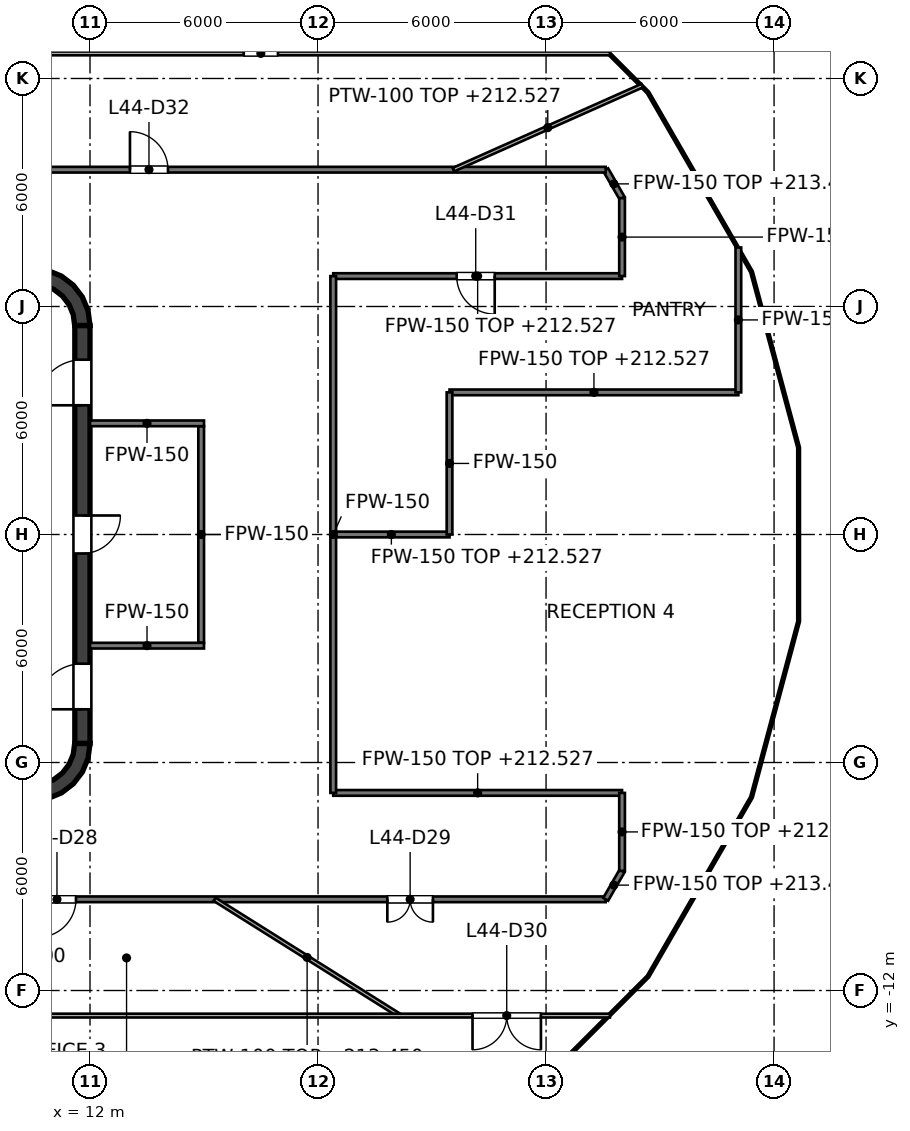
"""IFC4 building model, lengths in metres.
Left out: names, types, materials, properties, quantities, classifications, styles, units other than length and angle.
Written with IfcOpenShell. Run it as: python <this file> out.ifc"""

import sys

from ifc_helpers import new_model, si_unit, direction, frame, frame_2d, origin, place, context, subcontext, project, spatial, polyline, rectangle, outline, extrude, element, fill, save


model = new_model("IFC4")
c1 = context("Model", 3, precision=1e-05, world=origin(), true_north=direction((0.0, 1.0)))
c2 = subcontext(c1, "Body", "Model", "MODEL_VIEW")
j1 = project(units=[si_unit("LENGTHUNIT", "METRE"), si_unit("PLANEANGLEUNIT", "RADIAN")], contexts=[c1])
p1 = place(None, origin())
s1 = spatial("IfcSite", under=j1, at=p1, CompositionType="ELEMENT")
p2 = place(p1, origin())
s2 = spatial("IfcBuilding", under=s1, at=p2, CompositionType="ELEMENT")
p3 = place(p2, frame((0.0, 0.0, 209.6)))
s3 = spatial("IfcBuildingStorey", under=s2, at=p3, CompositionType="ELEMENT", Elevation=209.6)
p4 = place(p3, frame((11.8, -5.5, 0.0), z_axis=(0.0, 0.0, 1.0), x_axis=(0.0, 1.0, 0.0)))
e1 = element("IfcWall", 1, at=p4, inside=s3, PredefinedType="SHEAR", context=c2, shape_type="SweptSolid", body=[
    extrude(rectangle(XDim=11.0, YDim=0.4, at=frame_2d((5.5, 0.0))), origin(), (0.0, 0.0, 1.0), 4.0),
])
p5 = place(p4, frame((5.0, 0.0, 0.0)))
e2 = element("IfcOpeningElement", 2, at=p5, cuts=e1, PredefinedType="OPENING", context=c2, shape_type="SweptSolid", body=[
    extrude(rectangle(XDim=1.0, YDim=2.1, at=frame_2d((0.5, 1.05))), frame((0.0, 0.2, 0.0), z_axis=(0.0, -1.0, 0.0), x_axis=(1.0, 0.0, 0.0)), (0.0, 0.0, 1.0), 0.4),
])
p6 = place(p4, frame((0.9, 0.0, 0.0)))
e3 = element("IfcOpeningElement", 3, at=p6, cuts=e1, PredefinedType="OPENING", context=c2, shape_type="SweptSolid", body=[
    extrude(rectangle(XDim=1.2, YDim=2.1, at=frame_2d((0.6, 1.05))), frame((0.0, 0.2, 0.0), z_axis=(0.0, -1.0, 0.0), x_axis=(1.0, 0.0, 0.0)), (0.0, 0.0, 1.0), 0.4),
])
p7 = place(p4, frame((8.9, 0.0, 0.0)))
e4 = element("IfcOpeningElement", 4, at=p7, cuts=e1, PredefinedType="OPENING", context=c2, shape_type="SweptSolid", body=[
    extrude(rectangle(XDim=1.2, YDim=2.1, at=frame_2d((0.6, 1.05))), frame((0.0, 0.2, 0.0), z_axis=(0.0, -1.0, 0.0), x_axis=(1.0, 0.0, 0.0)), (0.0, 0.0, 1.0), 0.4),
])
p8 = place(p3, origin())
e5 = element("IfcWall", 5, at=p8, inside=s3, PredefinedType="SHEAR", context=c2, shape_type="SweptSolid", body=[
    extrude(outline(polyline([(10.5, 7.0), (10.5, 6.596), (10.784, 6.559), (11.048, 6.45), (11.275, 6.275), (11.45, 6.048), (11.559, 5.784), (11.596, 5.5), (12.0, 5.5), (11.949, 5.888), (11.799, 6.25), (11.561, 6.561), (11.25, 6.799), (10.888, 6.949), (10.5, 7.0)])), origin(), (0.0, 0.0, 1.0), 4.0),
])
e6 = element("IfcWall", 6, at=p8, inside=s3, PredefinedType="SHEAR", context=c2, shape_type="SweptSolid", body=[
    extrude(outline(polyline([(12.0, -5.5), (11.596, -5.5), (11.559, -5.784), (11.45, -6.048), (11.275, -6.275), (11.048, -6.45), (10.784, -6.559), (10.5, -6.596), (10.5, -7.0), (10.888, -6.949), (11.25, -6.799), (11.561, -6.561), (11.799, -6.25), (11.949, -5.888), (12.0, -5.5)])), origin(), (0.0, 0.0, 1.0), 4.0),
])
p9 = place(p3, frame((14.925, -2.85, 0.0), z_axis=(0.0, 0.0, 1.0), x_axis=(0.0, 1.0, 0.0)))
e7 = element("IfcWall", 7, at=p9, inside=s3, PredefinedType="PARTITIONING", context=c2, shape_type="SweptSolid", body=[
    extrude(rectangle(XDim=5.7, YDim=0.15, at=frame_2d((2.85, 0.0))), origin(), (0.0, 0.0, 1.0), 2.918),
])
for number, where, z_axis, x_axis in (
    (8, (12.0, 2.925, 0.0), (0.0, 0.0, 1.0), (1.0, 0.0, 0.0)),
    (9, (12.0, -2.925, 0.0), (0.0, 0.0, 1.0), (1.0, 0.0, 0.0)),
):
    element("IfcWall", number, at=place(p3, frame(where, z_axis=z_axis, x_axis=x_axis)), inside=s3, PredefinedType="PARTITIONING", context=c2, shape_type="SweptSolid", body=[
        extrude(rectangle(XDim=3.0, YDim=0.15, at=frame_2d((1.5, 0.0))), origin(), (0.0, 0.0, 1.0), 2.918),
    ])
p10 = place(p3, frame((25.569, 9.6, 0.0), z_axis=(0.0, 0.0, 1.0), x_axis=(0.499640762619, -0.866232710263, 0.0)))
e10 = element("IfcWall", 10, at=p10, inside=s3, PredefinedType="PARTITIONING", context=c2, shape_type="SweptSolid", body=[
    extrude(rectangle(XDim=0.863, YDim=0.15, at=frame_2d((0.431, 0.0))), origin(), (0.0, 0.0, 1.0), 3.85),
])
p11 = place(p3, frame((-25.569, -9.6, 0.0), z_axis=(0.0, 0.0, 1.0), x_axis=(1.0, 0.0, 0.0)))
e11 = element("IfcWall", 11, at=p11, inside=s3, PredefinedType="PARTITIONING", context=c2, shape_type="SweptSolid", body=[
    extrude(rectangle(XDim=51.138, YDim=0.15, at=frame_2d((25.569, 0.0))), origin(), (0.0, 0.0, 1.0), 2.918),
])
p12 = place(p11, frame((5.124, 0.0, 0.0)))
e12 = element("IfcOpeningElement", 12, at=p12, cuts=e11, PredefinedType="OPENING", context=c2, shape_type="SweptSolid", body=[
    extrude(rectangle(XDim=1.0, YDim=2.1, at=frame_2d((0.5, 1.05))), frame((0.0, 0.075, 0.0), z_axis=(0.0, -1.0, 0.0), x_axis=(1.0, 0.0, 0.0)), (0.0, 0.0, 1.0), 0.15),
])
p13 = place(p11, frame((13.983, 0.0, 0.0)))
e13 = element("IfcOpeningElement", 13, at=p13, cuts=e11, PredefinedType="OPENING", context=c2, shape_type="SweptSolid", body=[
    extrude(rectangle(XDim=1.0, YDim=2.1, at=frame_2d((0.5, 1.05))), frame((0.0, 0.075, 0.0), z_axis=(0.0, -1.0, 0.0), x_axis=(1.0, 0.0, 0.0)), (0.0, 0.0, 1.0), 0.15),
])
p14 = place(p11, frame((23.533, 0.0, 0.0)))
e14 = element("IfcOpeningElement", 14, at=p14, cuts=e11, PredefinedType="OPENING", context=c2, shape_type="SweptSolid", body=[
    extrude(rectangle(XDim=1.0, YDim=2.1, at=frame_2d((0.5, 1.05))), frame((0.0, 0.075, 0.0), z_axis=(0.0, -1.0, 0.0), x_axis=(1.0, 0.0, 0.0)), (0.0, 0.0, 1.0), 0.15),
])
p15 = place(p11, frame((29.847, 0.0, 0.0)))
e15 = element("IfcOpeningElement", 15, at=p15, cuts=e11, PredefinedType="OPENING", context=c2, shape_type="SweptSolid", body=[
    extrude(rectangle(XDim=1.0, YDim=2.1, at=frame_2d((0.5, 1.05))), frame((0.0, 0.075, 0.0), z_axis=(0.0, -1.0, 0.0), x_axis=(1.0, 0.0, 0.0)), (0.0, 0.0, 1.0), 0.15),
])
p16 = place(p11, frame((36.2, 0.0, 0.0)))
e16 = element("IfcOpeningElement", 16, at=p16, cuts=e11, PredefinedType="OPENING", context=c2, shape_type="SweptSolid", body=[
    extrude(rectangle(XDim=1.0, YDim=2.1, at=frame_2d((0.5, 1.05))), frame((0.0, 0.075, 0.0), z_axis=(0.0, -1.0, 0.0), x_axis=(1.0, 0.0, 0.0)), (0.0, 0.0, 1.0), 0.15),
])
p17 = place(p11, frame((45.393, 0.0, 0.0)))
e17 = element("IfcOpeningElement", 17, at=p17, cuts=e11, PredefinedType="OPENING", context=c2, shape_type="SweptSolid", body=[
    extrude(rectangle(XDim=1.2, YDim=2.1, at=frame_2d((0.6, 1.05))), frame((0.0, 0.075, 0.0), z_axis=(0.0, -1.0, 0.0), x_axis=(1.0, 0.0, 0.0)), (0.0, 0.0, 1.0), 0.15),
])
p18 = place(p3, frame((18.4, -6.8, 0.0), z_axis=(0.0, 0.0, 1.0), x_axis=(1.0, 0.0, 0.0)))
e18 = element("IfcWall", 18, at=p18, inside=s3, PredefinedType="PARTITIONING", context=c2, shape_type="SweptSolid", body=[
    extrude(rectangle(XDim=7.6, YDim=0.15, at=frame_2d((3.8, 0.0))), origin(), (0.0, 0.0, 1.0), 2.927),
])
p19 = place(p3, frame((18.4, 0.0, 0.0), z_axis=(0.0, 0.0, 1.0), x_axis=(1.0, 0.0, 0.0)))
e19 = element("IfcWall", 19, at=p19, inside=s3, PredefinedType="PARTITIONING", context=c2, shape_type="SweptSolid", body=[
    extrude(rectangle(XDim=3.06, YDim=0.15, at=frame_2d((1.53, 0.0))), origin(), (0.0, 0.0, 1.0), 2.927),
])
p20 = place(p3, frame((21.46, 3.74, 0.0), z_axis=(0.0, 0.0, 1.0), x_axis=(1.0, 0.0, 0.0)))
e20 = element("IfcWall", 20, at=p20, inside=s3, PredefinedType="PARTITIONING", context=c2, shape_type="SweptSolid", body=[
    extrude(rectangle(XDim=7.6, YDim=0.15, at=frame_2d((3.8, 0.0))), origin(), (0.0, 0.0, 1.0), 2.927),
])
p21 = place(p3, frame((18.4, 6.8, 0.0), z_axis=(0.0, 0.0, 1.0), x_axis=(1.0, 0.0, 0.0)))
e21 = element("IfcWall", 21, at=p21, inside=s3, PredefinedType="PARTITIONING", context=c2, shape_type="SweptSolid", body=[
    extrude(rectangle(XDim=7.6, YDim=0.15, at=frame_2d((3.8, 0.0))), origin(), (0.0, 0.0, 1.0), 2.927),
])
p22 = place(p21, frame((3.249, 0.0, 0.0)))
e22 = element("IfcOpeningElement", 22, at=p22, cuts=e21, PredefinedType="OPENING", context=c2, shape_type="SweptSolid", body=[
    extrude(rectangle(XDim=1.0, YDim=2.1, at=frame_2d((0.5, 1.05))), frame((0.0, 0.075, 0.0), z_axis=(0.0, -1.0, 0.0), x_axis=(1.0, 0.0, 0.0)), (0.0, 0.0, 1.0), 0.15),
])
p23 = place(p3, frame((-25.569, 9.6, 0.0), z_axis=(0.0, 0.0, 1.0), x_axis=(1.0, 0.0, 0.0)))
e23 = element("IfcWall", 23, at=p23, inside=s3, PredefinedType="PARTITIONING", context=c2, shape_type="SweptSolid", body=[
    extrude(rectangle(XDim=51.138, YDim=0.15, at=frame_2d((25.569, 0.0))), origin(), (0.0, 0.0, 1.0), 2.918),
])
p24 = place(p23, frame((28.563, 0.0, 0.0)))
e24 = element("IfcOpeningElement", 24, at=p24, cuts=e23, PredefinedType="OPENING", context=c2, shape_type="SweptSolid", body=[
    extrude(rectangle(XDim=1.0, YDim=2.1, at=frame_2d((0.5, 1.05))), frame((0.0, 0.075, 0.0), z_axis=(0.0, -1.0, 0.0), x_axis=(1.0, 0.0, 0.0)), (0.0, 0.0, 1.0), 0.15),
])
p25 = place(p23, frame((24.697, 0.0, 0.0)))
e25 = element("IfcOpeningElement", 25, at=p25, cuts=e23, PredefinedType="OPENING", context=c2, shape_type="SweptSolid", body=[
    extrude(rectangle(XDim=1.0, YDim=2.1, at=frame_2d((0.5, 1.05))), frame((0.0, 0.075, 0.0), z_axis=(0.0, -1.0, 0.0), x_axis=(1.0, 0.0, 0.0)), (0.0, 0.0, 1.0), 0.15),
])
p26 = place(p23, frame((19.174, 0.0, 0.0)))
e26 = element("IfcOpeningElement", 26, at=p26, cuts=e23, PredefinedType="OPENING", context=c2, shape_type="SweptSolid", body=[
    extrude(rectangle(XDim=1.0, YDim=2.1, at=frame_2d((0.5, 1.05))), frame((0.0, 0.075, 0.0), z_axis=(0.0, -1.0, 0.0), x_axis=(1.0, 0.0, 0.0)), (0.0, 0.0, 1.0), 0.15),
])
p27 = place(p23, frame((13.958, 0.0, 0.0)))
e27 = element("IfcOpeningElement", 27, at=p27, cuts=e23, PredefinedType="OPENING", context=c2, shape_type="SweptSolid", body=[
    extrude(rectangle(XDim=1.0, YDim=2.1, at=frame_2d((0.5, 1.05))), frame((0.0, 0.075, 0.0), z_axis=(0.0, -1.0, 0.0), x_axis=(1.0, 0.0, 0.0)), (0.0, 0.0, 1.0), 0.15),
])
p28 = place(p23, frame((5.823, 0.0, 0.0)))
e28 = element("IfcOpeningElement", 28, at=p28, cuts=e23, PredefinedType="OPENING", context=c2, shape_type="SweptSolid", body=[
    extrude(rectangle(XDim=1.2, YDim=2.1, at=frame_2d((0.6, 1.05))), frame((0.0, 0.075, 0.0), z_axis=(0.0, -1.0, 0.0), x_axis=(1.0, 0.0, 0.0)), (0.0, 0.0, 1.0), 0.15),
])
p29 = place(p23, frame((38.621, 0.0, 0.0)))
e29 = element("IfcOpeningElement", 29, at=p29, cuts=e23, PredefinedType="OPENING", context=c2, shape_type="SweptSolid", body=[
    extrude(rectangle(XDim=1.0, YDim=2.1, at=frame_2d((0.5, 1.05))), frame((0.0, 0.075, 0.0), z_axis=(0.0, -1.0, 0.0), x_axis=(1.0, 0.0, 0.0)), (0.0, 0.0, 1.0), 0.15),
])
p30 = place(p3, frame((25.569, -9.6, 0.0), z_axis=(0.0, 0.0, 1.0), x_axis=(0.499640762619, 0.866232710263, 0.0)))
e30 = element("IfcWall", 30, at=p30, inside=s3, PredefinedType="PARTITIONING", context=c2, shape_type="SweptSolid", body=[
    extrude(rectangle(XDim=0.863, YDim=0.15, at=frame_2d((0.431, 0.0))), origin(), (0.0, 0.0, 1.0), 3.85),
])
p31 = place(p3, frame((5.542, 9.6, 0.0), z_axis=(0.0, 0.0, 1.0), x_axis=(0.499892848626, 0.866087258821, 0.0)))
e31 = element("IfcWall", 31, at=p31, inside=s3, PredefinedType="PARTITIONING", context=c2, shape_type="SweptSolid", body=[
    extrude(rectangle(XDim=13.354, YDim=0.15, at=frame_2d((6.677, 0.0))), origin(), (0.0, 0.0, 1.0), 3.302),
])
p32 = place(p3, frame((29.06, 3.74, 0.0), z_axis=(0.0, 0.0, 1.0), x_axis=(0.0, 1.0, 0.0)))
e32 = element("IfcWall", 32, at=p32, inside=s3, PredefinedType="PARTITIONING", context=c2, shape_type="SweptSolid", body=[
    extrude(rectangle(XDim=3.813, YDim=0.15, at=frame_2d((1.906, 0.0))), origin(), (0.0, 0.0, 1.0), 2.918),
])
for number, where, z_axis, x_axis in (
    (33, (26.0, -8.853, 0.0), (0.0, 0.0, 1.0), (0.0, 1.0, 0.0)),
    (34, (26.0, 6.8, 0.0), (0.0, 0.0, 1.0), (0.0, 1.0, 0.0)),
):
    element("IfcWall", number, at=place(p3, frame(where, z_axis=z_axis, x_axis=x_axis)), inside=s3, PredefinedType="PARTITIONING", context=c2, shape_type="SweptSolid", body=[
        extrude(rectangle(XDim=2.053, YDim=0.15, at=frame_2d((1.026, 0.0))), origin(), (0.0, 0.0, 1.0), 2.927),
    ])
p33 = place(p3, frame((21.46, 0.0, 0.0), z_axis=(0.0, 0.0, 1.0), x_axis=(0.0, 1.0, 0.0)))
e35 = element("IfcWall", 35, at=p33, inside=s3, PredefinedType="PARTITIONING", context=c2, shape_type="SweptSolid", body=[
    extrude(rectangle(XDim=3.74, YDim=0.15, at=frame_2d((1.87, 0.0))), origin(), (0.0, 0.0, 1.0), 2.918),
])
p34 = place(p3, frame((18.4, -6.8, 0.0), z_axis=(0.0, 0.0, 1.0), x_axis=(0.0, 1.0, 0.0)))
e36 = element("IfcWall", 36, at=p34, inside=s3, PredefinedType="PARTITIONING", context=c2, shape_type="SweptSolid", body=[
    extrude(rectangle(XDim=13.6, YDim=0.15, at=frame_2d((6.8, 0.0))), origin(), (0.0, 0.0, 1.0), 2.918),
])
p35 = place(p3, frame((15.278, -9.6, 0.0), z_axis=(0.0, 0.0, 1.0), x_axis=(0.84673434941, -0.532015922252, 0.0)))
e37 = element("IfcWall", 37, at=p35, inside=s3, PredefinedType="PARTITIONING", context=c2, shape_type="SweptSolid", body=[
    extrude(rectangle(XDim=5.751, YDim=0.1, at=frame_2d((2.876, 0.0))), origin(), (0.0, 0.0, 1.0), 3.85),
])
p36 = place(p3, frame((-21.928, -12.66, 0.0), z_axis=(0.0, 0.0, 1.0), x_axis=(1.0, 0.0, 0.0)))
e38 = element("IfcWall", 38, at=p36, inside=s3, PredefinedType="PARTITIONING", context=c2, shape_type="SweptSolid", body=[
    extrude(rectangle(XDim=47.609, YDim=0.1, at=frame_2d((23.804, 0.0))), origin(), (0.0, 0.0, 1.0), 2.918),
])
p37 = place(p36, frame((19.02, 0.0, 0.0)))
e39 = element("IfcOpeningElement", 39, at=p37, cuts=e38, PredefinedType="OPENING", context=c2, shape_type="SweptSolid", body=[
    extrude(rectangle(XDim=1.8, YDim=2.1, at=frame_2d((0.9, 1.05))), frame((0.0, 0.05, 0.0), z_axis=(0.0, -1.0, 0.0), x_axis=(1.0, 0.0, 0.0)), (0.0, 0.0, 1.0), 0.1),
])
p38 = place(p36, frame((43.993, 0.0, 0.0)))
e40 = element("IfcOpeningElement", 40, at=p38, cuts=e38, PredefinedType="OPENING", context=c2, shape_type="SweptSolid", body=[
    extrude(rectangle(XDim=1.8, YDim=2.1, at=frame_2d((0.9, 1.05))), frame((0.0, 0.05, 0.0), z_axis=(0.0, -1.0, 0.0), x_axis=(1.0, 0.0, 0.0)), (0.0, 0.0, 1.0), 0.1),
])
p39 = place(p3, frame((-16.646, 12.66, 0.0), z_axis=(0.0, 0.0, 1.0), x_axis=(1.0, 0.0, 0.0)))
e41 = element("IfcWall", 41, at=p39, inside=s3, PredefinedType="PARTITIONING", context=c2, shape_type="SweptSolid", body=[
    extrude(rectangle(XDim=42.327, YDim=0.1, at=frame_2d((21.164, 0.0))), origin(), (0.0, 0.0, 1.0), 2.918),
])
p40 = place(p39, frame((7.92, 0.0, 0.0)))
e42 = element("IfcOpeningElement", 42, at=p40, cuts=e41, PredefinedType="OPENING", context=c2, shape_type="SweptSolid", body=[
    extrude(rectangle(XDim=1.8, YDim=2.1, at=frame_2d((0.9, 1.05))), frame((0.0, 0.05, 0.0), z_axis=(0.0, -1.0, 0.0), x_axis=(1.0, 0.0, 0.0)), (0.0, 0.0, 1.0), 0.1),
])
p41 = place(p39, frame((32.691, 0.0, 0.0)))
e43 = element("IfcOpeningElement", 43, at=p41, cuts=e41, PredefinedType="OPENING", context=c2, shape_type="SweptSolid", body=[
    extrude(rectangle(XDim=0.9, YDim=2.1, at=frame_2d((0.45, 1.05))), frame((0.0, 0.05, 0.0), z_axis=(0.0, -1.0, 0.0), x_axis=(1.0, 0.0, 0.0)), (0.0, 0.0, 1.0), 0.1),
])
p42 = place(p3, frame((21.561, 9.6, 0.0), z_axis=(0.0, 0.0, 1.0), x_axis=(0.913544765656, 0.406738197299, 0.0)))
e44 = element("IfcWall", 44, at=p42, inside=s3, PredefinedType="PARTITIONING", context=c2, shape_type="SweptSolid", body=[
    extrude(rectangle(XDim=5.438, YDim=0.1, at=frame_2d((2.719, 0.0))), origin(), (0.0, 0.0, 1.0), 2.927),
])
p43 = place(p5, origin())
e45 = element("IfcDoor", 45, at=p43, inside=s3, OperationType="SINGLE_SWING_RIGHT", PredefinedType="DOOR", context=c2, shape_type="SweptSolid", body=[
    extrude(rectangle(XDim=1.0, YDim=2.1, at=frame_2d((0.5, 1.05))), frame((0.0, 0.025, 0.0), z_axis=(0.0, -1.0, 0.0), x_axis=(1.0, 0.0, 0.0)), (0.0, 0.0, 1.0), 0.05),
])
fill(e2, e45)
p44 = place(p6, origin())
e46 = element("IfcDoor", 46, at=p44, inside=s3, OperationType="SINGLE_SWING_LEFT", PredefinedType="DOOR", context=c2, shape_type="SweptSolid", body=[
    extrude(rectangle(XDim=1.2, YDim=2.1, at=frame_2d((0.6, 1.05))), frame((0.0, 0.025, 0.0), z_axis=(0.0, -1.0, 0.0), x_axis=(1.0, 0.0, 0.0)), (0.0, 0.0, 1.0), 0.05),
])
fill(e3, e46)
p45 = place(p7, origin())
e47 = element("IfcDoor", 47, at=p45, inside=s3, OperationType="SINGLE_SWING_LEFT", PredefinedType="DOOR", context=c2, shape_type="SweptSolid", body=[
    extrude(rectangle(XDim=1.2, YDim=2.1, at=frame_2d((0.6, 1.05))), frame((0.0, 0.025, 0.0), z_axis=(0.0, -1.0, 0.0), x_axis=(1.0, 0.0, 0.0)), (0.0, 0.0, 1.0), 0.05),
])
fill(e4, e47)
p46 = place(p16, origin())
e48 = element("IfcDoor", 48, at=p46, inside=s3, OperationType="SINGLE_SWING_LEFT", PredefinedType="DOOR", context=c2, shape_type="SweptSolid", body=[
    extrude(rectangle(XDim=1.0, YDim=2.1, at=frame_2d((0.5, 1.05))), frame((0.0, 0.025, 0.0), z_axis=(0.0, -1.0, 0.0), x_axis=(1.0, 0.0, 0.0)), (0.0, 0.0, 1.0), 0.05),
])
fill(e16, e48)
p47 = place(p17, origin())
e49 = element("IfcDoor", 49, at=p47, inside=s3, OperationType="DOUBLE_DOOR_SINGLE_SWING", PredefinedType="DOOR", context=c2, shape_type="SweptSolid", body=[
    extrude(rectangle(XDim=1.2, YDim=2.1, at=frame_2d((0.6, 1.05))), frame((0.0, 0.025, 0.0), z_axis=(0.0, -1.0, 0.0), x_axis=(1.0, 0.0, 0.0)), (0.0, 0.0, 1.0), 0.05),
])
fill(e17, e49)
p48 = place(p38, origin())
e50 = element("IfcDoor", 50, at=p48, inside=s3, OperationType="DOUBLE_DOOR_SINGLE_SWING", PredefinedType="DOOR", context=c2, shape_type="SweptSolid", body=[
    extrude(rectangle(XDim=1.8, YDim=2.1, at=frame_2d((0.9, 1.05))), frame((0.0, 0.025, 0.0), z_axis=(0.0, -1.0, 0.0), x_axis=(1.0, 0.0, 0.0)), (0.0, 0.0, 1.0), 0.05),
])
fill(e40, e50)
p49 = place(p22, origin())
e51 = element("IfcDoor", 51, at=p49, inside=s3, OperationType="SINGLE_SWING_RIGHT", PredefinedType="DOOR", context=c2, shape_type="SweptSolid", body=[
    extrude(rectangle(XDim=1.0, YDim=2.1, at=frame_2d((0.5, 1.05))), frame((0.0, 0.025, 0.0), z_axis=(0.0, -1.0, 0.0), x_axis=(1.0, 0.0, 0.0)), (0.0, 0.0, 1.0), 0.05),
])
fill(e22, e51)
p50 = place(p29, origin())
e52 = element("IfcDoor", 52, at=p50, inside=s3, OperationType="SINGLE_SWING_LEFT", PredefinedType="DOOR", context=c2, shape_type="SweptSolid", body=[
    extrude(rectangle(XDim=1.0, YDim=2.1, at=frame_2d((0.5, 1.05))), frame((0.0, 0.025, 0.0), z_axis=(0.0, -1.0, 0.0), x_axis=(1.0, 0.0, 0.0)), (0.0, 0.0, 1.0), 0.05),
])
fill(e29, e52)
p51 = place(p41, origin())
e53 = element("IfcDoor", 53, at=p51, inside=s3, OperationType="SINGLE_SWING_LEFT", PredefinedType="DOOR", context=c2, shape_type="SweptSolid", body=[
    extrude(rectangle(XDim=0.9, YDim=2.1, at=frame_2d((0.45, 1.05))), frame((0.0, 0.025, 0.0), z_axis=(0.0, -1.0, 0.0), x_axis=(1.0, 0.0, 0.0)), (0.0, 0.0, 1.0), 0.05),
])
fill(e43, e53)
save(model, sys.argv[1])
